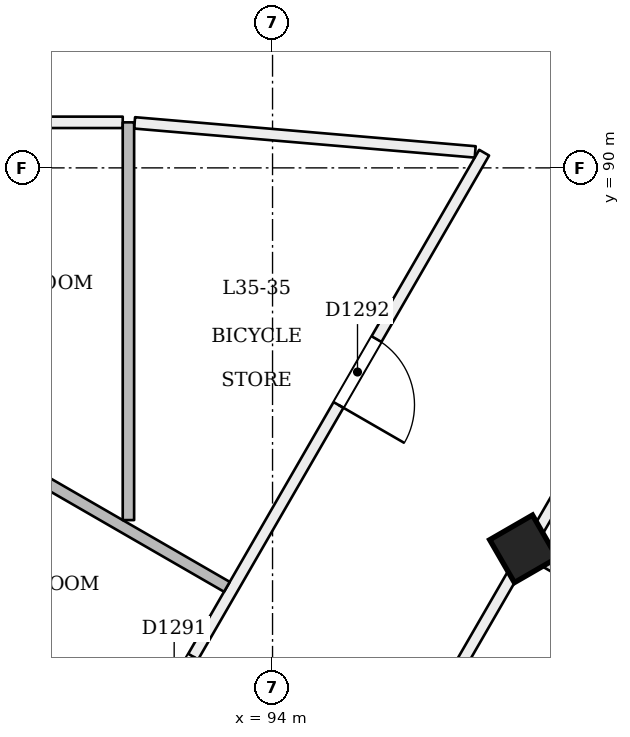
"""IFC4 building model, lengths in metres.
Left out: names, types, materials, properties, quantities, classifications, styles, units other than length and angle.
Written with IfcOpenShell. Run it as: python <this file> out.ifc"""

import sys

from ifc_helpers import new_model, si_unit, direction, frame, frame_2d, origin, origin_2d, place, context, subcontext, project, spatial, rectangle, extrude, element, fill, save


model = new_model("IFC4")
c1 = context("Model", 3, precision=1e-05, world=origin(), true_north=direction((0.0, 1.0)))
c2 = subcontext(c1, "Body", "Model", "MODEL_VIEW")
j1 = project(units=[si_unit("LENGTHUNIT", "METRE"), si_unit("PLANEANGLEUNIT", "RADIAN")], contexts=[c1])
p1 = place(None, origin())
s1 = spatial("IfcSite", under=j1, at=p1, CompositionType="ELEMENT")
p2 = place(p1, origin())
s2 = spatial("IfcBuilding", under=s1, at=p2, CompositionType="ELEMENT")
p3 = place(p2, frame((0.0, 0.0, 138.6)))
s3 = spatial("IfcBuildingStorey", under=s2, at=p3, CompositionType="ELEMENT", Elevation=138.6)
p4 = place(p3, frame((97.328, 84.941, -0.02), z_axis=(-0.022222910879, 0.038415824599, 0.999014697916), x_axis=(-0.499512974266, -0.866022161456, 0.022190187181)))
e1 = element("IfcColumn", 1, at=p4, inside=s3, PredefinedType="COLUMN", context=c2, shape_type="SweptSolid", body=[
    extrude(rectangle(XDim=0.65, YDim=0.65, at=origin_2d()), origin(), (0.0, 0.0, 1.0), 3.604),
])
p5 = place(p3, frame((96.784, 90.2, 0.0), z_axis=(0.0, 0.0, 1.0), x_axis=(-0.499996251233, -0.866027568125, 0.0)))
e2 = element("IfcWall", 2, at=p5, inside=s3, PredefinedType="PARTITIONING", context=c2, shape_type="SweptSolid", body=[
    extrude(rectangle(XDim=23.568, YDim=0.15, at=frame_2d((11.784, 0.0))), origin(), (0.0, 0.0, 1.0), 3.15),
])
p6 = place(p5, frame((17.972, 0.0, 0.0)))
e3 = element("IfcOpeningElement", 3, at=p6, cuts=e2, PredefinedType="OPENING", context=c2, shape_type="SweptSolid", body=[
    extrude(rectangle(XDim=1.0, YDim=2.1, at=frame_2d((0.5, 1.05))), frame((0.0, 0.085, 0.0), z_axis=(0.0, -1.0, 0.0), x_axis=(1.0, 0.0, 0.0)), (0.0, 0.0, 1.0), 0.171),
])
p7 = place(p5, frame((13.976, 0.0, 0.0)))
e4 = element("IfcOpeningElement", 4, at=p7, cuts=e2, PredefinedType="OPENING", context=c2, shape_type="SweptSolid", body=[
    extrude(rectangle(XDim=1.0, YDim=2.1, at=frame_2d((0.5, 1.05))), frame((0.0, 0.085, 0.0), z_axis=(0.0, -1.0, 0.0), x_axis=(1.0, 0.0, 0.0)), (0.0, 0.0, 1.0), 0.171),
])
p8 = place(p5, frame((11.077, 0.0, 0.0)))
e5 = element("IfcOpeningElement", 5, at=p8, cuts=e2, PredefinedType="OPENING", context=c2, shape_type="SweptSolid", body=[
    extrude(rectangle(XDim=1.0, YDim=2.1, at=frame_2d((0.5, 1.05))), frame((0.0, 0.085, 0.0), z_axis=(0.0, -1.0, 0.0), x_axis=(1.0, 0.0, 0.0)), (0.0, 0.0, 1.0), 0.171),
])
p9 = place(p5, frame((7.656, 0.0, 0.0)))
e6 = element("IfcOpeningElement", 6, at=p9, cuts=e2, PredefinedType="OPENING", context=c2, shape_type="SweptSolid", body=[
    extrude(rectangle(XDim=1.0, YDim=2.1, at=frame_2d((0.5, 1.05))), frame((0.0, 0.085, 0.0), z_axis=(0.0, -1.0, 0.0), x_axis=(1.0, 0.0, 0.0)), (0.0, 0.0, 1.0), 0.171),
])
p10 = place(p5, frame((2.832, 0.0, 0.0)))
e7 = element("IfcOpeningElement", 7, at=p10, cuts=e2, PredefinedType="OPENING", context=c2, shape_type="SweptSolid", body=[
    extrude(rectangle(XDim=1.0, YDim=2.1, at=frame_2d((0.5, 1.05))), frame((0.0, 0.085, 0.0), z_axis=(0.0, -1.0, 0.0), x_axis=(1.0, 0.0, 0.0)), (0.0, 0.0, 1.0), 0.171),
])
p11 = place(p3, frame((85.054, 63.684, 0.0), z_axis=(0.0, 0.0, 1.0), x_axis=(0.499999704591, 0.866025574339, 0.0)))
e8 = element("IfcWall", 8, at=p11, inside=s3, PredefinedType="PARTITIONING", context=c2, shape_type="SweptSolid", body=[
    extrude(rectangle(XDim=40.094, YDim=0.15, at=frame_2d((20.047, 0.0))), origin(), (0.0, 0.0, 1.0), 2.75),
])
p12 = place(p11, frame((0.506, 0.0, 0.0)))
e9 = element("IfcOpeningElement", 9, at=p12, cuts=e8, PredefinedType="OPENING", context=c2, shape_type="SweptSolid", body=[
    extrude(rectangle(XDim=1.2, YDim=2.1, at=frame_2d((0.6, 1.05))), frame((0.0, 0.085, 0.0), z_axis=(0.0, -1.0, 0.0), x_axis=(1.0, 0.0, 0.0)), (0.0, 0.0, 1.0), 0.171),
])
p13 = place(p11, frame((2.767, 0.0, 0.0)))
e10 = element("IfcOpeningElement", 10, at=p13, cuts=e8, PredefinedType="OPENING", context=c2, shape_type="SweptSolid", body=[
    extrude(rectangle(XDim=1.0, YDim=2.1, at=frame_2d((0.5, 1.05))), frame((0.0, 0.085, 0.0), z_axis=(0.0, -1.0, 0.0), x_axis=(1.0, 0.0, 0.0)), (0.0, 0.0, 1.0), 0.171),
])
p14 = place(p11, frame((8.297, 0.0, 0.0)))
e11 = element("IfcOpeningElement", 11, at=p14, cuts=e8, PredefinedType="OPENING", context=c2, shape_type="SweptSolid", body=[
    extrude(rectangle(XDim=1.0, YDim=2.1, at=frame_2d((0.5, 1.05))), frame((0.0, 0.085, 0.0), z_axis=(0.0, -1.0, 0.0), x_axis=(1.0, 0.0, 0.0)), (0.0, 0.0, 1.0), 0.171),
])
p15 = place(p11, frame((11.652, 0.0, 0.0)))
e12 = element("IfcOpeningElement", 12, at=p15, cuts=e8, PredefinedType="OPENING", context=c2, shape_type="SweptSolid", body=[
    extrude(rectangle(XDim=1.0, YDim=2.1, at=frame_2d((0.5, 1.05))), frame((0.0, 0.085, 0.0), z_axis=(0.0, -1.0, 0.0), x_axis=(1.0, 0.0, 0.0)), (0.0, 0.0, 1.0), 0.171),
])
p16 = place(p11, frame((18.327, 0.0, 0.0)))
e13 = element("IfcOpeningElement", 13, at=p16, cuts=e8, PredefinedType="OPENING", context=c2, shape_type="SweptSolid", body=[
    extrude(rectangle(XDim=1.0, YDim=2.1, at=frame_2d((0.5, 1.05))), frame((0.0, 0.085, 0.0), z_axis=(0.0, -1.0, 0.0), x_axis=(1.0, 0.0, 0.0)), (0.0, 0.0, 1.0), 0.171),
])
p17 = place(p11, frame((20.767, 0.0, 0.0)))
e14 = element("IfcOpeningElement", 14, at=p17, cuts=e8, PredefinedType="OPENING", context=c2, shape_type="SweptSolid", body=[
    extrude(rectangle(XDim=1.0, YDim=2.1, at=frame_2d((0.5, 1.05))), frame((0.0, 0.085, 0.0), z_axis=(0.0, -1.0, 0.0), x_axis=(1.0, 0.0, 0.0)), (0.0, 0.0, 1.0), 0.171),
])
p18 = place(p11, frame((26.297, 0.0, 0.0)))
e15 = element("IfcOpeningElement", 15, at=p18, cuts=e8, PredefinedType="OPENING", context=c2, shape_type="SweptSolid", body=[
    extrude(rectangle(XDim=1.0, YDim=2.1, at=frame_2d((0.5, 1.05))), frame((0.0, 0.085, 0.0), z_axis=(0.0, -1.0, 0.0), x_axis=(1.0, 0.0, 0.0)), (0.0, 0.0, 1.0), 0.171),
])
p19 = place(p11, frame((31.847, 0.0, 0.0)))
e16 = element("IfcOpeningElement", 16, at=p19, cuts=e8, PredefinedType="OPENING", context=c2, shape_type="SweptSolid", body=[
    extrude(rectangle(XDim=1.2, YDim=2.1, at=frame_2d((0.6, 1.05))), frame((0.0, 0.085, 0.0), z_axis=(0.0, -1.0, 0.0), x_axis=(1.0, 0.0, 0.0)), (0.0, 0.0, 1.0), 0.171),
])
p20 = place(p11, frame((38.694, 0.0, 0.0)))
e17 = element("IfcOpeningElement", 17, at=p20, cuts=e8, PredefinedType="OPENING", context=c2, shape_type="SweptSolid", body=[
    extrude(rectangle(XDim=1.2, YDim=2.1, at=frame_2d((0.6, 1.05))), frame((0.0, 0.085, 0.0), z_axis=(0.0, -1.0, 0.0), x_axis=(1.0, 0.0, 0.0)), (0.0, 0.0, 1.0), 0.171),
])
p21 = place(p3, frame((92.185, 90.592, 0.0), z_axis=(0.0, 0.0, 1.0), x_axis=(0.996384428795, -0.08495922584, 0.0)))
e18 = element("IfcWall", 18, at=p21, inside=s3, PredefinedType="PARTITIONING", context=c2, shape_type="SweptSolid", body=[
    extrude(rectangle(XDim=4.497, YDim=0.15, at=frame_2d((2.249, 0.0))), origin(), (0.0, 0.0, 1.0), 3.15),
])
p22 = place(p3, frame((88.0, 90.6, 0.0), z_axis=(0.0, 0.0, 1.0), x_axis=(0.999999970626, -0.000242380166, 0.0)))
e19 = element("IfcWall", 19, at=p22, inside=s3, PredefinedType="PARTITIONING", context=c2, shape_type="SweptSolid", body=[
    extrude(rectangle(XDim=4.029, YDim=0.15, at=frame_2d((2.015, 0.0))), origin(), (0.0, 0.0, 1.0), 3.15),
])
p23 = place(p22, frame((1.746, 0.0, 0.0)))
e20 = element("IfcOpeningElement", 20, at=p23, cuts=e19, PredefinedType="OPENING", context=c2, shape_type="SweptSolid", body=[
    extrude(rectangle(XDim=1.0, YDim=2.1, at=frame_2d((0.5, 1.05))), frame((0.0, 0.085, 0.0), z_axis=(0.0, -1.0, 0.0), x_axis=(1.0, 0.0, 0.0)), (0.0, 0.0, 1.0), 0.171),
])
p24 = place(p3, frame((102.87, 81.742, 0.0), z_axis=(0.0, 0.0, 1.0), x_axis=(-0.866025537322, 0.499999768706, 0.0)))
e21 = element("IfcWall", 21, at=p24, inside=s3, PredefinedType="PARTITIONING", context=c2, shape_type="SweptSolid", body=[
    extrude(rectangle(XDim=6.325, YDim=0.1, at=frame_2d((3.163, 0.0))), origin(), (0.0, 0.0, 1.0), 2.65),
])
p25 = place(p3, frame((91.79, 81.7, 0.0), z_axis=(0.0, 0.0, 1.0), x_axis=(-0.866006276197, 0.50003312849, 0.0)))
e22 = element("IfcWall", 22, at=p25, inside=s3, PredefinedType="PARTITIONING", context=c2, shape_type="SweptSolid", body=[
    extrude(rectangle(XDim=4.376, YDim=0.15, at=frame_2d((2.188, 0.0))), origin(), (0.0, 0.0, 1.0), 3.15),
])
p26 = place(p3, frame((93.4, 84.488, 0.0), z_axis=(0.0, 0.0, 1.0), x_axis=(-0.866029742693, 0.499992484715, 0.0)))
e23 = element("IfcWall", 23, at=p26, inside=s3, PredefinedType="PARTITIONING", context=c2, shape_type="SweptSolid", body=[
    extrude(rectangle(XDim=6.235, YDim=0.15, at=frame_2d((3.117, 0.0))), origin(), (0.0, 0.0, 1.0), 3.15),
])
p27 = place(p3, frame((92.104, 90.599, 0.0), z_axis=(0.0, 0.0, 1.0), x_axis=(0.0, -1.0, 0.0)))
e24 = element("IfcWall", 24, at=p27, inside=s3, PredefinedType="PARTITIONING", context=c2, shape_type="SweptSolid", body=[
    extrude(rectangle(XDim=5.233, YDim=0.15, at=frame_2d((2.616, 0.0))), origin(), (0.0, 0.0, 1.0), 3.15),
])
p28 = place(p9, origin())
e25 = element("IfcDoor", 25, at=p28, inside=s3, OperationType="SINGLE_SWING_LEFT", PredefinedType="NOTDEFINED", context=c2, shape_type="SweptSolid", body=[
    extrude(rectangle(XDim=1.0, YDim=2.1, at=frame_2d((0.5, 1.05))), frame((0.0, 0.025, 0.0), z_axis=(0.0, -1.0, 0.0), x_axis=(1.0, 0.0, 0.0)), (0.0, 0.0, 1.0), 0.05),
])
fill(e6, e25)
p29 = place(p10, origin())
e26 = element("IfcDoor", 26, at=p29, inside=s3, OperationType="SINGLE_SWING_RIGHT", PredefinedType="NOTDEFINED", context=c2, shape_type="SweptSolid", body=[
    extrude(rectangle(XDim=1.0, YDim=2.1, at=frame_2d((0.5, 1.05))), frame((0.0, 0.025, 0.0), z_axis=(0.0, -1.0, 0.0), x_axis=(1.0, 0.0, 0.0)), (0.0, 0.0, 1.0), 0.05),
])
fill(e7, e26)
save(model, sys.argv[1])
